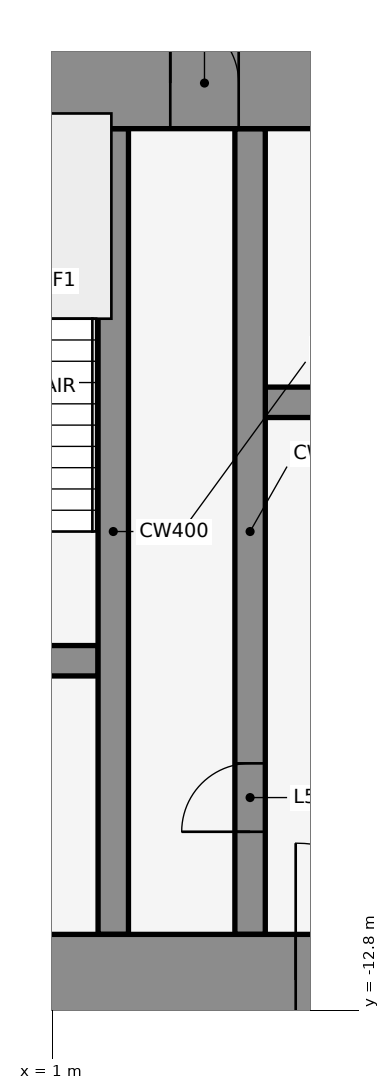
"""IFC4 building model, lengths in metres.
Left out: names, types, materials, properties, quantities, classifications, styles, units other than length and angle.
Written with IfcOpenShell. Run it as: python <this file> out.ifc"""

import sys

from ifc_helpers import new_model, si_unit, direction, frame, frame_2d, origin, place, context, subcontext, project, spatial, rectangle, extrude, element, fill, save


model = new_model("IFC4")
c1 = context("Model", 3, precision=1e-05, world=origin(), true_north=direction((0.0, 1.0)))
c2 = subcontext(c1, "Body", "Model", "MODEL_VIEW")
j1 = project(units=[si_unit("LENGTHUNIT", "METRE"), si_unit("PLANEANGLEUNIT", "RADIAN")], contexts=[c1])
p1 = place(None, origin())
s1 = spatial("IfcSite", under=j1, at=p1, CompositionType="ELEMENT")
p2 = place(p1, origin())
s2 = spatial("IfcBuilding", under=s1, at=p2, CompositionType="ELEMENT")
p3 = place(p2, frame((0.0, 0.0, 227.8)))
s3 = spatial("IfcBuildingStorey", under=s2, at=p3, CompositionType="ELEMENT", Elevation=227.8)
p4 = place(p3, frame((1.901, 1.08, 0.0), z_axis=(0.0, 0.0, 1.0), x_axis=(-0.83981312244, -0.542875602121, 0.0)))
e1 = element("IfcWall", 1, at=p4, inside=s3, PredefinedType="STANDARD", context=c2, shape_type="SweptSolid", body=[
    extrude(rectangle(XDim=2.183, YDim=0.25, at=frame_2d((1.091, 0.0))), origin(), (0.0, 0.0, 1.0), 3.95),
])
p5 = place(p3, frame((-1.6, -8.2, 0.0), z_axis=(0.0, 0.0, 1.0), x_axis=(1.0, 0.0, 0.0)))
e2 = element("IfcWall", 2, at=p5, inside=s3, PredefinedType="SHEAR", context=c2, shape_type="SweptSolid", body=[
    extrude(rectangle(XDim=3.2, YDim=0.4, at=frame_2d((1.6, 0.0))), origin(), (0.0, 0.0, 1.0), 4.1),
])
p6 = place(p5, frame((1.05, 0.0, 0.0)))
e3 = element("IfcOpeningElement", 3, at=p6, cuts=e2, PredefinedType="OPENING", context=c2, shape_type="SweptSolid", body=[
    extrude(rectangle(XDim=1.2, YDim=2.1, at=frame_2d((0.6, 1.05))), frame((0.0, 0.212, 0.0), z_axis=(0.0, -1.0, 0.0), x_axis=(1.0, 0.0, 0.0)), (0.0, 0.0, 1.0), 0.424),
])
p7 = place(p3, frame((3.8, -4.8, 0.0), z_axis=(0.0, 0.0, 1.0), x_axis=(1.0, 0.0, 0.0)))
e4 = element("IfcWall", 4, at=p7, inside=s3, PredefinedType="SHEAR", context=c2, shape_type="SweptSolid", body=[
    extrude(rectangle(XDim=13.6, YDim=0.4, at=frame_2d((6.8, 0.0))), origin(), (0.0, 0.0, 1.0), 4.1),
])
p8 = place(p7, frame((9.45, 0.0, 0.0)))
e5 = element("IfcOpeningElement", 5, at=p8, cuts=e4, PredefinedType="OPENING", context=c2, shape_type="SweptSolid", body=[
    extrude(rectangle(XDim=1.1, YDim=2.1, at=frame_2d((0.55, 1.05))), frame((0.0, 0.212, 0.0), z_axis=(0.0, -1.0, 0.0), x_axis=(1.0, 0.0, 0.0)), (0.0, 0.0, 1.0), 0.424),
])
p9 = place(p7, frame((11.85, 0.0, 0.0)))
e6 = element("IfcOpeningElement", 6, at=p9, cuts=e4, PredefinedType="OPENING", context=c2, shape_type="SweptSolid", body=[
    extrude(rectangle(XDim=1.1, YDim=2.1, at=frame_2d((0.55, 1.05))), frame((0.0, 0.212, 0.0), z_axis=(0.0, -1.0, 0.0), x_axis=(1.0, 0.0, 0.0)), (0.0, 0.0, 1.0), 0.424),
])
p10 = place(p7, frame((2.45, 0.0, 0.0)))
e7 = element("IfcOpeningElement", 7, at=p10, cuts=e4, PredefinedType="OPENING", context=c2, shape_type="SweptSolid", body=[
    extrude(rectangle(XDim=0.9, YDim=2.1, at=frame_2d((0.45, 1.05))), frame((0.0, 0.212, 0.0), z_axis=(0.0, -1.0, 0.0), x_axis=(1.0, 0.0, 0.0)), (0.0, 0.0, 1.0), 0.424),
])
p11 = place(p7, frame((6.85, 0.0, 0.0)))
e8 = element("IfcOpeningElement", 8, at=p11, cuts=e4, PredefinedType="OPENING", context=c2, shape_type="SweptSolid", body=[
    extrude(rectangle(XDim=0.9, YDim=2.1, at=frame_2d((0.45, 1.05))), frame((0.0, 0.212, 0.0), z_axis=(0.0, -1.0, 0.0), x_axis=(1.0, 0.0, 0.0)), (0.0, 0.0, 1.0), 0.424),
])
p12 = place(p3, frame((1.8, -11.8, 0.0), z_axis=(0.0, 0.0, 1.0), x_axis=(0.0, 1.0, 0.0)))
e9 = element("IfcWall", 9, at=p12, inside=s3, PredefinedType="SHEAR", context=c2, shape_type="SweptSolid", body=[
    extrude(rectangle(XDim=10.6, YDim=0.4, at=frame_2d((5.3, 0.0))), origin(), (0.0, 0.0, 1.0), 4.1),
])
p13 = place(p3, frame((3.6, -11.8, 0.0), z_axis=(0.0, 0.0, 1.0), x_axis=(0.0, 1.0, 0.0)))
e10 = element("IfcWall", 10, at=p13, inside=s3, PredefinedType="SHEAR", context=c2, shape_type="SweptSolid", body=[
    extrude(rectangle(XDim=10.6, YDim=0.4, at=frame_2d((5.3, 0.0))), origin(), (0.0, 0.0, 1.0), 4.1),
])
p14 = place(p13, frame((1.35, 0.0, 0.0)))
e11 = element("IfcOpeningElement", 11, at=p14, cuts=e10, PredefinedType="OPENING", context=c2, shape_type="SweptSolid", body=[
    extrude(rectangle(XDim=0.9, YDim=2.1, at=frame_2d((0.45, 1.05))), frame((0.0, 0.212, 0.0), z_axis=(0.0, -1.0, 0.0), x_axis=(1.0, 0.0, 0.0)), (0.0, 0.0, 1.0), 0.424),
])
p15 = place(p3, frame((-22.0, -0.6, 0.0), z_axis=(0.0, 0.0, 1.0), x_axis=(1.0, 0.0, 0.0)))
e12 = element("IfcWall", 12, at=p15, inside=s3, PredefinedType="SHEAR", context=c2, shape_type="SweptSolid", body=[
    extrude(rectangle(XDim=44.0, YDim=1.2, at=frame_2d((22.0, 0.0))), origin(), (0.0, 0.0, 1.0), 4.1),
])
p16 = place(p15, frame((18.55, 0.0, 0.0)))
e13 = element("IfcOpeningElement", 13, at=p16, cuts=e12, PredefinedType="OPENING", context=c2, shape_type="SweptSolid", body=[
    extrude(rectangle(XDim=0.9, YDim=2.1, at=frame_2d((0.45, 1.05))), frame((0.0, 0.612, 0.0), z_axis=(0.0, -1.0, 0.0), x_axis=(1.0, 0.0, 0.0)), (0.0, 0.0, 1.0), 1.224),
])
p17 = place(p15, frame((24.55, 0.0, 0.0)))
e14 = element("IfcOpeningElement", 14, at=p17, cuts=e12, PredefinedType="OPENING", context=c2, shape_type="SweptSolid", body=[
    extrude(rectangle(XDim=0.9, YDim=2.1, at=frame_2d((0.45, 1.05))), frame((0.0, 0.612, 0.0), z_axis=(0.0, -1.0, 0.0), x_axis=(1.0, 0.0, 0.0)), (0.0, 0.0, 1.0), 1.224),
])
p18 = place(p3, frame((-22.0, -12.4, 0.0), z_axis=(0.0, 0.0, 1.0), x_axis=(1.0, 0.0, 0.0)))
e15 = element("IfcWall", 15, at=p18, inside=s3, PredefinedType="SHEAR", context=c2, shape_type="SweptSolid", body=[
    extrude(rectangle(XDim=44.0, YDim=1.2, at=frame_2d((22.0, 0.0))), origin(), (0.0, 0.0, 1.0), 4.1),
])
p19 = place(p18, frame((2.2, 0.0, 0.0)))
e16 = element("IfcOpeningElement", 16, at=p19, cuts=e15, PredefinedType="OPENING", context=c2, shape_type="SweptSolid", body=[
    extrude(rectangle(XDim=1.2, YDim=2.1, at=frame_2d((0.6, 1.05))), frame((0.0, 0.612, 0.0), z_axis=(0.0, -1.0, 0.0), x_axis=(1.0, 0.0, 0.0)), (0.0, 0.0, 1.0), 1.224),
])
p20 = place(p18, frame((21.4, 0.0, 0.0)))
e17 = element("IfcOpeningElement", 17, at=p20, cuts=e15, PredefinedType="OPENING", context=c2, shape_type="SweptSolid", body=[
    extrude(rectangle(XDim=1.2, YDim=2.1, at=frame_2d((0.6, 1.05))), frame((0.0, 0.612, 0.0), z_axis=(0.0, -1.0, 0.0), x_axis=(1.0, 0.0, 0.0)), (0.0, 0.0, 1.0), 1.224),
])
p21 = place(p18, frame((40.6, 0.0, 0.0)))
e18 = element("IfcOpeningElement", 18, at=p21, cuts=e15, PredefinedType="OPENING", context=c2, shape_type="SweptSolid", body=[
    extrude(rectangle(XDim=1.2, YDim=2.1, at=frame_2d((0.6, 1.05))), frame((0.0, 0.612, 0.0), z_axis=(0.0, -1.0, 0.0), x_axis=(1.0, 0.0, 0.0)), (0.0, 0.0, 1.0), 1.224),
])
p22 = place(p18, frame((16.0, 0.0, 0.0)))
e19 = element("IfcOpeningElement", 19, at=p22, cuts=e15, PredefinedType="OPENING", context=c2, shape_type="SweptSolid", body=[
    extrude(rectangle(XDim=1.8, YDim=2.1, at=frame_2d((0.9, 1.05))), frame((0.0, 0.612, 0.0), z_axis=(0.0, -1.0, 0.0), x_axis=(1.0, 0.0, 0.0)), (0.0, 0.0, 1.0), 1.224),
])
p23 = place(p18, frame((6.3, 0.0, 0.0)))
e20 = element("IfcOpeningElement", 20, at=p23, cuts=e15, PredefinedType="OPENING", context=c2, shape_type="SweptSolid", body=[
    extrude(rectangle(XDim=1.2, YDim=2.1, at=frame_2d((0.6, 1.05))), frame((0.0, 0.612, 0.0), z_axis=(0.0, -1.0, 0.0), x_axis=(1.0, 0.0, 0.0)), (0.0, 0.0, 1.0), 1.224),
])
p24 = place(p18, frame((26.2, 0.0, 0.0)))
e21 = element("IfcOpeningElement", 21, at=p24, cuts=e15, PredefinedType="OPENING", context=c2, shape_type="SweptSolid", body=[
    extrude(rectangle(XDim=1.8, YDim=2.1, at=frame_2d((0.9, 1.05))), frame((0.0, 0.612, 0.0), z_axis=(0.0, -1.0, 0.0), x_axis=(1.0, 0.0, 0.0)), (0.0, 0.0, 1.0), 1.224),
])
p25 = place(p18, frame((36.5, 0.0, 0.0)))
e22 = element("IfcOpeningElement", 22, at=p25, cuts=e15, PredefinedType="OPENING", context=c2, shape_type="SweptSolid", body=[
    extrude(rectangle(XDim=1.2, YDim=2.1, at=frame_2d((0.6, 1.05))), frame((0.0, 0.612, 0.0), z_axis=(0.0, -1.0, 0.0), x_axis=(1.0, 0.0, 0.0)), (0.0, 0.0, 1.0), 1.224),
])
p26 = place(p14, origin())
e23 = element("IfcDoor", 23, at=p26, inside=s3, OperationType="SINGLE_SWING_LEFT", PredefinedType="DOOR", context=c2, shape_type="SweptSolid", body=[
    extrude(rectangle(XDim=0.9, YDim=2.1, at=frame_2d((0.45, 1.05))), frame((0.0, 0.025, 0.0), z_axis=(0.0, -1.0, 0.0), x_axis=(1.0, 0.0, 0.0)), (0.0, 0.0, 1.0), 0.05),
])
fill(e11, e23)
p27 = place(p17, origin())
e24 = element("IfcDoor", 24, at=p27, inside=s3, OperationType="SINGLE_SWING_LEFT", PredefinedType="DOOR", context=c2, shape_type="SweptSolid", body=[
    extrude(rectangle(XDim=0.9, YDim=2.1, at=frame_2d((0.45, 1.05))), frame((0.0, 0.025, 0.0), z_axis=(0.0, -1.0, 0.0), x_axis=(1.0, 0.0, 0.0)), (0.0, 0.0, 1.0), 0.05),
])
fill(e14, e24)
p28 = place(p24, origin())
e25 = element("IfcDoor", 25, at=p28, inside=s3, OperationType="SINGLE_SWING_LEFT", PredefinedType="DOOR", context=c2, shape_type="SweptSolid", body=[
    extrude(rectangle(XDim=1.8, YDim=2.1, at=frame_2d((0.9, 1.05))), frame((0.0, 0.025, 0.0), z_axis=(0.0, -1.0, 0.0), x_axis=(1.0, 0.0, 0.0)), (0.0, 0.0, 1.0), 0.05),
])
fill(e21, e25)
save(model, sys.argv[1])
